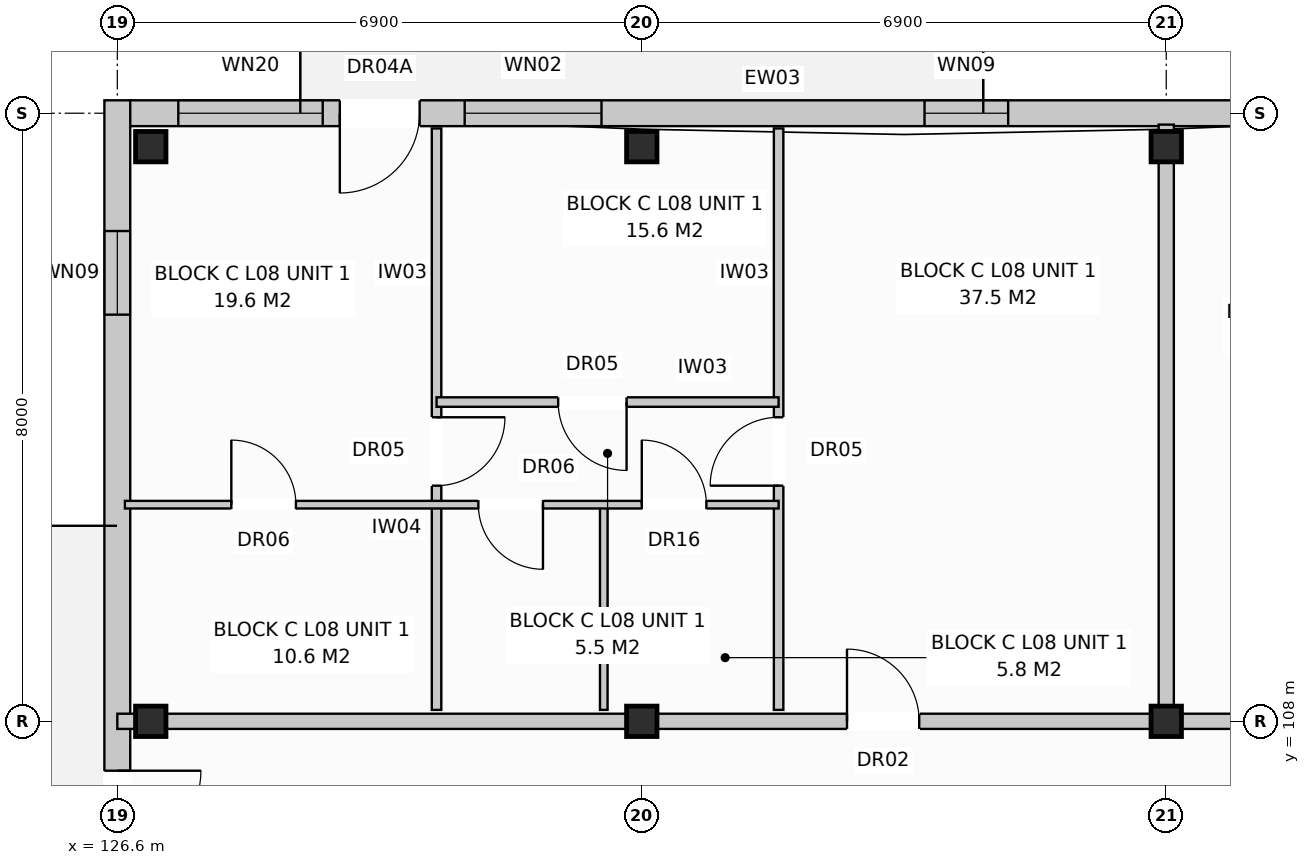
"""IFC4 building model, lengths in metres.
Left out: names, types, materials, properties, quantities, classifications, styles, units other than length and angle.
Written with IfcOpenShell. Run it as: python <this file> out.ifc"""

import sys

from ifc_helpers import new_model, si_unit, direction, frame, frame_2d, origin, origin_with_axes, origin_2d, place, context, subcontext, project, spatial, rectangle, extrude, element, fill, save


model = new_model("IFC4")
c1 = context("Model", 3, precision=1e-05, world=origin(), true_north=direction((0.0, 1.0)))
c2 = subcontext(c1, "Body", "Model", "MODEL_VIEW")
j1 = project(units=[si_unit("LENGTHUNIT", "METRE"), si_unit("PLANEANGLEUNIT", "RADIAN")], contexts=[c1])
p1 = place(None, origin())
s1 = spatial("IfcSite", under=j1, at=p1, CompositionType="ELEMENT")
p2 = place(p1, origin())
s2 = spatial("IfcBuilding", under=s1, at=p2, CompositionType="ELEMENT")
p3 = place(p2, frame((0.0, 0.0, 27.2)))
s3 = spatial("IfcBuildingStorey", under=s2, at=p3, CompositionType="ELEMENT", Elevation=27.2)
for number, where, z_axis, x_axis in (
    (1, (127.04, 108.0, 0.0), (0.0, 0.0, 1.0), (1.0, 0.0, 0.0)),
    (2, (127.04, 115.56, 0.0), (0.0, 0.0, 1.0), (1.0, 0.0, 0.0)),
    (3, (133.5, 108.0, 0.0), (0.0, 0.0, 1.0), (1.0, 0.0, 0.0)),
    (4, (133.5, 115.56, 0.0), (0.0, 0.0, 1.0), (1.0, 0.0, 0.0)),
    (5, (140.4, 108.0, 0.0), (0.0, 0.0, 1.0), (1.0, 0.0, 0.0)),
    (6, (140.4, 115.56, 0.0), (0.0, 0.0, 1.0), (1.0, 0.0, 0.0)),
):
    element("IfcColumn", number, at=place(p3, frame(where, z_axis=z_axis, x_axis=x_axis)), inside=s3, PredefinedType="COLUMN", context=c2, shape_type="SweptSolid", body=[
        extrude(rectangle(XDim=0.4, YDim=0.4, at=origin_2d()), origin(), (0.0, 0.0, 1.0), 3.2),
    ])
p4 = place(p3, frame((126.76, 116.0, 0.0), z_axis=(0.0, 0.0, 1.0), x_axis=(1.0, 0.0, 0.0)))
e7 = element("IfcWall", 7, at=p4, inside=s3, PredefinedType="STANDARD", context=c2, shape_type="SweptSolid", body=[
    extrude(rectangle(XDim=41.08, YDim=0.34, at=frame_2d((20.54, 0.0))), origin(), (0.0, 0.0, 1.0), 2.96),
])
p5 = place(p4, frame((2.767, 0.0, 0.0)))
e8 = element("IfcOpeningElement", 8, at=p5, cuts=e7, PredefinedType="OPENING", context=c2, shape_type="SweptSolid", body=[
    extrude(rectangle(XDim=1.05, YDim=2.12, at=frame_2d((0.525, 1.06))), frame((0.0, 0.182, 0.0), z_axis=(0.0, -1.0, 0.0), x_axis=(1.0, 0.0, 0.0)), (0.0, 0.0, 1.0), 0.364),
])
p6 = place(p4, frame((17.567, 0.0, 0.0)))
e9 = element("IfcOpeningElement", 9, at=p6, cuts=e7, PredefinedType="OPENING", context=c2, shape_type="SweptSolid", body=[
    extrude(rectangle(XDim=1.05, YDim=2.12, at=frame_2d((0.525, 1.06))), frame((0.0, 0.182, 0.0), z_axis=(0.0, -1.0, 0.0), x_axis=(1.0, 0.0, 0.0)), (0.0, 0.0, 1.0), 0.364),
])
p7 = place(p4, frame((30.067, 0.0, 0.0)))
e10 = element("IfcOpeningElement", 10, at=p7, cuts=e7, PredefinedType="OPENING", context=c2, shape_type="SweptSolid", body=[
    extrude(rectangle(XDim=1.05, YDim=2.12, at=frame_2d((0.525, 1.06))), frame((0.0, 0.182, 0.0), z_axis=(0.0, -1.0, 0.0), x_axis=(1.0, 0.0, 0.0)), (0.0, 0.0, 1.0), 0.364),
])
p8 = place(p4, frame((0.642, 0.0, 0.8)))
e11 = element("IfcOpeningElement", 11, at=p8, cuts=e7, PredefinedType="OPENING", context=c2, shape_type="SweptSolid", body=[
    extrude(rectangle(XDim=1.9, YDim=1.85, at=frame_2d((0.95, 0.925))), frame((0.0, 0.182, 0.0), z_axis=(0.0, -1.0, 0.0), x_axis=(1.0, 0.0, 0.0)), (0.0, 0.0, 1.0), 0.364),
])
p9 = place(p4, frame((4.41, 0.0, 0.8)))
e12 = element("IfcOpeningElement", 12, at=p9, cuts=e7, PredefinedType="OPENING", context=c2, shape_type="SweptSolid", body=[
    extrude(rectangle(XDim=1.8, YDim=1.7, at=frame_2d((0.9, 0.85))), frame((0.0, 0.182, 0.0), z_axis=(0.0, -1.0, 0.0), x_axis=(1.0, 0.0, 0.0)), (0.0, 0.0, 1.0), 0.364),
])
p10 = place(p4, frame((10.46, 0.0, 0.72)))
e13 = element("IfcOpeningElement", 13, at=p10, cuts=e7, PredefinedType="OPENING", context=c2, shape_type="SweptSolid", body=[
    extrude(rectangle(XDim=1.1, YDim=1.5, at=frame_2d((0.55, 0.75))), frame((0.0, 0.182, 0.0), z_axis=(0.0, -1.0, 0.0), x_axis=(1.0, 0.0, 0.0)), (0.0, 0.0, 1.0), 0.364),
])
p11 = place(p4, frame((15.76, 0.0, 0.72)))
e14 = element("IfcOpeningElement", 14, at=p11, cuts=e7, PredefinedType="OPENING", context=c2, shape_type="SweptSolid", body=[
    extrude(rectangle(XDim=1.1, YDim=1.5, at=frame_2d((0.55, 0.75))), frame((0.0, 0.182, 0.0), z_axis=(0.0, -1.0, 0.0), x_axis=(1.0, 0.0, 0.0)), (0.0, 0.0, 1.0), 0.364),
])
p12 = place(p4, frame((21.11, 0.0, 0.8)))
e15 = element("IfcOpeningElement", 15, at=p12, cuts=e7, PredefinedType="OPENING", context=c2, shape_type="SweptSolid", body=[
    extrude(rectangle(XDim=1.8, YDim=1.7, at=frame_2d((0.9, 0.85))), frame((0.0, 0.182, 0.0), z_axis=(0.0, -1.0, 0.0), x_axis=(1.0, 0.0, 0.0)), (0.0, 0.0, 1.0), 0.364),
])
p13 = place(p4, frame((24.66, 0.0, 0.72)))
e16 = element("IfcOpeningElement", 16, at=p13, cuts=e7, PredefinedType="OPENING", context=c2, shape_type="SweptSolid", body=[
    extrude(rectangle(XDim=1.1, YDim=1.5, at=frame_2d((0.55, 0.75))), frame((0.0, 0.182, 0.0), z_axis=(0.0, -1.0, 0.0), x_axis=(1.0, 0.0, 0.0)), (0.0, 0.0, 1.0), 0.364),
])
p14 = place(p4, frame((27.892, 0.0, 0.8)))
e17 = element("IfcOpeningElement", 17, at=p14, cuts=e7, PredefinedType="OPENING", context=c2, shape_type="SweptSolid", body=[
    extrude(rectangle(XDim=1.95, YDim=1.65, at=frame_2d((0.975, 0.825))), frame((0.0, 0.182, 0.0), z_axis=(0.0, -1.0, 0.0), x_axis=(1.0, 0.0, 0.0)), (0.0, 0.0, 1.0), 0.364),
])
p15 = place(p4, frame((31.91, 0.0, 0.8)))
e18 = element("IfcOpeningElement", 18, at=p15, cuts=e7, PredefinedType="OPENING", context=c2, shape_type="SweptSolid", body=[
    extrude(rectangle(XDim=1.8, YDim=1.7, at=frame_2d((0.9, 0.85))), frame((0.0, 0.182, 0.0), z_axis=(0.0, -1.0, 0.0), x_axis=(1.0, 0.0, 0.0)), (0.0, 0.0, 1.0), 0.364),
])
p16 = place(p4, frame((35.36, 0.0, 0.72)))
e19 = element("IfcOpeningElement", 19, at=p16, cuts=e7, PredefinedType="OPENING", context=c2, shape_type="SweptSolid", body=[
    extrude(rectangle(XDim=1.9, YDim=1.85, at=frame_2d((0.95, 0.925))), frame((0.0, 0.182, 0.0), z_axis=(0.0, -1.0, 0.0), x_axis=(1.0, 0.0, 0.0)), (0.0, 0.0, 1.0), 0.364),
])
p17 = place(p4, frame((38.525, 0.0, 0.8)))
e20 = element("IfcOpeningElement", 20, at=p17, cuts=e7, PredefinedType="OPENING", context=c2, shape_type="SweptSolid", body=[
    extrude(rectangle(XDim=1.95, YDim=1.65, at=frame_2d((0.975, 0.825))), frame((0.0, 0.182, 0.0), z_axis=(0.0, -1.0, 0.0), x_axis=(1.0, 0.0, 0.0)), (0.0, 0.0, 1.0), 0.364),
])
p18 = place(p3, frame((126.6, 97.43, 0.0), z_axis=(0.0, 0.0, 1.0), x_axis=(0.0, 1.0, 0.0)))
e21 = element("IfcWall", 21, at=p18, inside=s3, PredefinedType="STANDARD", context=c2, shape_type="SweptSolid", body=[
    extrude(rectangle(XDim=18.74, YDim=0.34, at=frame_2d((9.37, 0.0))), origin(), (0.0, 0.0, 1.0), 2.96),
])
p19 = place(p18, frame((8.82, 0.0, 0.0)))
e22 = element("IfcOpeningElement", 22, at=p19, cuts=e21, PredefinedType="OPENING", context=c2, shape_type="SweptSolid", body=[
    extrude(rectangle(XDim=1.1, YDim=2.1, at=frame_2d((0.55, 1.05))), frame((0.0, 0.182, 0.0), z_axis=(0.0, -1.0, 0.0), x_axis=(1.0, 0.0, 0.0)), (0.0, 0.0, 1.0), 0.364),
])
p20 = place(p18, frame((15.92, 0.0, 0.72)))
e23 = element("IfcOpeningElement", 23, at=p20, cuts=e21, PredefinedType="OPENING", context=c2, shape_type="SweptSolid", body=[
    extrude(rectangle(XDim=1.1, YDim=1.5, at=frame_2d((0.55, 0.75))), frame((0.0, 0.182, 0.0), z_axis=(0.0, -1.0, 0.0), x_axis=(1.0, 0.0, 0.0)), (0.0, 0.0, 1.0), 0.364),
])
p21 = place(p3, frame((140.4, 108.15, 0.0), z_axis=(0.0, 0.0, 1.0), x_axis=(0.0, 1.0, 0.0)))
e24 = element("IfcWall", 24, at=p21, inside=s3, PredefinedType="PARTITIONING", context=c2, shape_type="SweptSolid", body=[
    extrude(rectangle(XDim=7.7, YDim=0.2, at=frame_2d((3.85, 0.0))), origin(), (0.0, 0.0, 1.0), 2.96),
])
p22 = place(p3, frame((126.6, 108.0, 0.0), z_axis=(0.0, 0.0, 1.0), x_axis=(1.0, 0.0, 0.0)))
e25 = element("IfcWall", 25, at=p22, inside=s3, PredefinedType="PARTITIONING", context=c2, shape_type="SweptSolid", body=[
    extrude(rectangle(XDim=13.8, YDim=0.2, at=frame_2d((6.9, 0.0))), origin(), (0.0, 0.0, 1.0), 2.4),
])
p23 = place(p22, frame((9.6, 0.0, 0.0)))
e26 = element("IfcOpeningElement", 26, at=p23, cuts=e25, PredefinedType="OPENING", context=c2, shape_type="SweptSolid", body=[
    extrude(rectangle(XDim=0.95, YDim=2.15, at=frame_2d((0.475, 1.075))), frame((0.0, 0.112, 0.0), z_axis=(0.0, -1.0, 0.0), x_axis=(1.0, 0.0, 0.0)), (0.0, 0.0, 1.0), 0.224),
])
p24 = place(p3, frame((135.3, 108.15, 0.0), z_axis=(0.0, 0.0, 1.0), x_axis=(0.0, 1.0, 0.0)))
e27 = element("IfcWall", 27, at=p24, inside=s3, PredefinedType="PARTITIONING", context=c2, shape_type="SweptSolid", body=[
    extrude(rectangle(XDim=7.65, YDim=0.125, at=frame_2d((3.825, 0.0))), origin(), (0.0, 0.0, 1.0), 2.96),
])
p25 = place(p24, frame((2.95, 0.0, 0.0)))
e28 = element("IfcOpeningElement", 28, at=p25, cuts=e27, PredefinedType="OPENING", context=c2, shape_type="SweptSolid", body=[
    extrude(rectangle(XDim=0.9, YDim=2.1, at=frame_2d((0.45, 1.05))), frame((0.0, 0.074, 0.0), z_axis=(0.0, -1.0, 0.0), x_axis=(1.0, 0.0, 0.0)), (0.0, 0.0, 1.0), 0.149),
])
p26 = place(p3, frame((130.8, 108.15, 0.0), z_axis=(0.0, 0.0, 1.0), x_axis=(0.0, 1.0, 0.0)))
e29 = element("IfcWall", 29, at=p26, inside=s3, PredefinedType="PARTITIONING", context=c2, shape_type="SweptSolid", body=[
    extrude(rectangle(XDim=7.65, YDim=0.125, at=frame_2d((3.825, 0.0))), origin(), (0.0, 0.0, 1.0), 2.96),
])
p27 = place(p26, frame((2.95, 0.0, 0.0)))
e30 = element("IfcOpeningElement", 30, at=p27, cuts=e29, PredefinedType="OPENING", context=c2, shape_type="SweptSolid", body=[
    extrude(rectangle(XDim=0.9, YDim=2.1, at=frame_2d((0.45, 1.05))), frame((0.0, 0.074, 0.0), z_axis=(0.0, -1.0, 0.0), x_axis=(1.0, 0.0, 0.0)), (0.0, 0.0, 1.0), 0.149),
])
p28 = place(p3, frame((133.0, 108.15, 0.0), z_axis=(0.0, 0.0, 1.0), x_axis=(0.0, 1.0, 0.0)))
e31 = element("IfcWall", 31, at=p28, inside=s3, PredefinedType="PARTITIONING", context=c2, shape_type="SweptSolid", body=[
    extrude(rectangle(XDim=2.7, YDim=0.1, at=frame_2d((1.35, 0.0))), origin(), (0.0, 0.0, 1.0), 2.96),
])
p29 = place(p3, frame((126.7, 110.85, 0.0), z_axis=(0.0, 0.0, 1.0), x_axis=(1.0, 0.0, 0.0)))
e32 = element("IfcWall", 32, at=p29, inside=s3, PredefinedType="PARTITIONING", context=c2, shape_type="SweptSolid", body=[
    extrude(rectangle(XDim=8.6, YDim=0.1, at=frame_2d((4.3, 0.0))), origin(), (0.0, 0.0, 1.0), 2.96),
])
p30 = place(p29, frame((1.4, 0.0, 0.0)))
e33 = element("IfcOpeningElement", 33, at=p30, cuts=e32, PredefinedType="OPENING", context=c2, shape_type="SweptSolid", body=[
    extrude(rectangle(XDim=0.85, YDim=2.05, at=frame_2d((0.425, 1.025))), frame((0.0, 0.062, 0.0), z_axis=(0.0, -1.0, 0.0), x_axis=(1.0, 0.0, 0.0)), (0.0, 0.0, 1.0), 0.124),
])
p31 = place(p29, frame((4.65, 0.0, 0.0)))
e34 = element("IfcOpeningElement", 34, at=p31, cuts=e32, PredefinedType="OPENING", context=c2, shape_type="SweptSolid", body=[
    extrude(rectangle(XDim=0.85, YDim=2.05, at=frame_2d((0.425, 1.025))), frame((0.0, 0.062, 0.0), z_axis=(0.0, -1.0, 0.0), x_axis=(1.0, 0.0, 0.0)), (0.0, 0.0, 1.0), 0.124),
])
p32 = place(p29, frame((6.8, 0.0, 0.0)))
e35 = element("IfcOpeningElement", 35, at=p32, cuts=e32, PredefinedType="OPENING", context=c2, shape_type="SweptSolid", body=[
    extrude(rectangle(XDim=0.85, YDim=2.1, at=frame_2d((0.425, 1.05))), frame((0.0, 0.062, 0.0), z_axis=(0.0, -1.0, 0.0), x_axis=(1.0, 0.0, 0.0)), (0.0, 0.0, 1.0), 0.124),
])
p33 = place(p3, frame((130.8, 112.2, 0.0), z_axis=(0.0, 0.0, 1.0), x_axis=(1.0, 0.0, 0.0)))
e36 = element("IfcWall", 36, at=p33, inside=s3, PredefinedType="PARTITIONING", context=c2, shape_type="SweptSolid", body=[
    extrude(rectangle(XDim=4.5, YDim=0.125, at=frame_2d((2.25, 0.0))), origin(), (0.0, 0.0, 1.0), 2.96),
])
p34 = place(p33, frame((1.6, 0.0, 0.0)))
e37 = element("IfcOpeningElement", 37, at=p34, cuts=e36, PredefinedType="OPENING", context=c2, shape_type="SweptSolid", body=[
    extrude(rectangle(XDim=0.9, YDim=2.1, at=frame_2d((0.45, 1.05))), frame((0.0, 0.074, 0.0), z_axis=(0.0, -1.0, 0.0), x_axis=(1.0, 0.0, 0.0)), (0.0, 0.0, 1.0), 0.149),
])
p35 = place(p3, frame((140.4, 108.0, 0.0), z_axis=(0.0, 0.0, 1.0), x_axis=(1.0, 0.0, 0.0)))
e38 = element("IfcWall", 38, at=p35, inside=s3, PredefinedType="PARTITIONING", context=c2, shape_type="SweptSolid", body=[
    extrude(rectangle(XDim=13.8, YDim=0.2, at=frame_2d((6.9, 0.0))), origin(), (0.0, 0.0, 1.0), 2.4),
])
p36 = place(p35, frame((2.4, 0.0, 0.0)))
e39 = element("IfcOpeningElement", 39, at=p36, cuts=e38, PredefinedType="OPENING", context=c2, shape_type="SweptSolid", body=[
    extrude(rectangle(XDim=0.95, YDim=2.15, at=frame_2d((0.475, 1.075))), frame((0.0, 0.112, 0.0), z_axis=(0.0, -1.0, 0.0), x_axis=(1.0, 0.0, 0.0)), (0.0, 0.0, 1.0), 0.224),
])
p37 = place(p5, frame((1.05, 0.0, 0.0), z_axis=(0.0, 0.0, 1.0), x_axis=(-1.0, 0.0, 0.0)))
e40 = element("IfcDoor", 40, at=p37, inside=s3, OperationType="SINGLE_SWING_LEFT", PredefinedType="DOOR", context=c2, shape_type="SweptSolid", body=[
    extrude(rectangle(XDim=1.05, YDim=2.12, at=frame_2d((0.525, 1.06))), frame((0.0, 0.025, 0.0), z_axis=(0.0, -1.0, 0.0), x_axis=(1.0, 0.0, 0.0)), (0.0, 0.0, 1.0), 0.05),
])
fill(e8, e40)
p38 = place(p8, origin_with_axes())
e41 = element("IfcWindow", 41, at=p38, inside=s3, PartitioningType="SINGLE_PANEL", PredefinedType="WINDOW", context=c2, shape_type="SweptSolid", body=[
    extrude(rectangle(XDim=1.9, YDim=1.85, at=frame_2d((0.95, 0.925))), frame((0.0, 0.03, 0.0), z_axis=(0.0, -1.0, 0.0), x_axis=(1.0, 0.0, 0.0)), (0.0, 0.0, 1.0), 0.06),
])
fill(e11, e41)
p39 = place(p9, origin_with_axes())
e42 = element("IfcWindow", 42, at=p39, inside=s3, PartitioningType="SINGLE_PANEL", PredefinedType="WINDOW", context=c2, shape_type="SweptSolid", body=[
    extrude(rectangle(XDim=1.8, YDim=1.7, at=frame_2d((0.9, 0.85))), frame((0.0, 0.03, 0.0), z_axis=(0.0, -1.0, 0.0), x_axis=(1.0, 0.0, 0.0)), (0.0, 0.0, 1.0), 0.06),
])
fill(e12, e42)
p40 = place(p10, origin_with_axes())
e43 = element("IfcWindow", 43, at=p40, inside=s3, PartitioningType="SINGLE_PANEL", PredefinedType="WINDOW", context=c2, shape_type="SweptSolid", body=[
    extrude(rectangle(XDim=1.1, YDim=1.5, at=frame_2d((0.55, 0.75))), frame((0.0, 0.03, 0.0), z_axis=(0.0, -1.0, 0.0), x_axis=(1.0, 0.0, 0.0)), (0.0, 0.0, 1.0), 0.06),
])
fill(e13, e43)
p41 = place(p19, frame((1.1, 0.0, 0.0), z_axis=(0.0, 0.0, 1.0), x_axis=(-1.0, 0.0, 0.0)))
e44 = element("IfcDoor", 44, at=p41, inside=s3, OperationType="SINGLE_SWING_RIGHT", PredefinedType="DOOR", context=c2, shape_type="SweptSolid", body=[
    extrude(rectangle(XDim=1.1, YDim=2.1, at=frame_2d((0.55, 1.05))), frame((0.0, 0.025, 0.0), z_axis=(0.0, -1.0, 0.0), x_axis=(1.0, 0.0, 0.0)), (0.0, 0.0, 1.0), 0.05),
])
fill(e22, e44)
p42 = place(p20, origin_with_axes())
e45 = element("IfcWindow", 45, at=p42, inside=s3, PartitioningType="SINGLE_PANEL", PredefinedType="WINDOW", context=c2, shape_type="SweptSolid", body=[
    extrude(rectangle(XDim=1.1, YDim=1.5, at=frame_2d((0.55, 0.75))), frame((0.0, 0.03, 0.0), z_axis=(0.0, -1.0, 0.0), x_axis=(1.0, 0.0, 0.0)), (0.0, 0.0, 1.0), 0.06),
])
fill(e23, e45)
p43 = place(p23, origin_with_axes())
e46 = element("IfcDoor", 46, at=p43, inside=s3, OperationType="SINGLE_SWING_LEFT", PredefinedType="DOOR", context=c2, shape_type="SweptSolid", body=[
    extrude(rectangle(XDim=0.95, YDim=2.15, at=frame_2d((0.475, 1.075))), frame((0.0, 0.025, 0.0), z_axis=(0.0, -1.0, 0.0), x_axis=(1.0, 0.0, 0.0)), (0.0, 0.0, 1.0), 0.05),
])
fill(e26, e46)
p44 = place(p25, origin_with_axes())
e47 = element("IfcDoor", 47, at=p44, inside=s3, OperationType="SINGLE_SWING_LEFT", PredefinedType="DOOR", context=c2, shape_type="SweptSolid", body=[
    extrude(rectangle(XDim=0.9, YDim=2.1, at=frame_2d((0.45, 1.05))), frame((0.0, 0.025, 0.0), z_axis=(0.0, -1.0, 0.0), x_axis=(1.0, 0.0, 0.0)), (0.0, 0.0, 1.0), 0.05),
])
fill(e28, e47)
p45 = place(p27, frame((0.9, 0.0, 0.0), z_axis=(0.0, 0.0, 1.0), x_axis=(-1.0, 0.0, 0.0)))
e48 = element("IfcDoor", 48, at=p45, inside=s3, OperationType="SINGLE_SWING_RIGHT", PredefinedType="DOOR", context=c2, shape_type="SweptSolid", body=[
    extrude(rectangle(XDim=0.9, YDim=2.1, at=frame_2d((0.45, 1.05))), frame((0.0, 0.025, 0.0), z_axis=(0.0, -1.0, 0.0), x_axis=(1.0, 0.0, 0.0)), (0.0, 0.0, 1.0), 0.05),
])
fill(e30, e48)
p46 = place(p30, origin_with_axes())
e49 = element("IfcDoor", 49, at=p46, inside=s3, OperationType="SINGLE_SWING_LEFT", PredefinedType="DOOR", context=c2, shape_type="SweptSolid", body=[
    extrude(rectangle(XDim=0.85, YDim=2.05, at=frame_2d((0.425, 1.025))), frame((0.0, 0.025, 0.0), z_axis=(0.0, -1.0, 0.0), x_axis=(1.0, 0.0, 0.0)), (0.0, 0.0, 1.0), 0.05),
])
fill(e33, e49)
p47 = place(p31, frame((0.85, 0.0, 0.0), z_axis=(0.0, 0.0, 1.0), x_axis=(-1.0, 0.0, 0.0)))
e50 = element("IfcDoor", 50, at=p47, inside=s3, OperationType="SINGLE_SWING_RIGHT", PredefinedType="DOOR", context=c2, shape_type="SweptSolid", body=[
    extrude(rectangle(XDim=0.85, YDim=2.05, at=frame_2d((0.425, 1.025))), frame((0.0, 0.025, 0.0), z_axis=(0.0, -1.0, 0.0), x_axis=(1.0, 0.0, 0.0)), (0.0, 0.0, 1.0), 0.05),
])
fill(e34, e50)
p48 = place(p32, origin_with_axes())
e51 = element("IfcDoor", 51, at=p48, inside=s3, OperationType="SINGLE_SWING_LEFT", PredefinedType="DOOR", context=c2, shape_type="SweptSolid", body=[
    extrude(rectangle(XDim=0.85, YDim=2.1, at=frame_2d((0.425, 1.05))), frame((0.0, 0.025, 0.0), z_axis=(0.0, -1.0, 0.0), x_axis=(1.0, 0.0, 0.0)), (0.0, 0.0, 1.0), 0.05),
])
fill(e35, e51)
p49 = place(p34, frame((0.9, 0.0, 0.0), z_axis=(0.0, 0.0, 1.0), x_axis=(-1.0, 0.0, 0.0)))
e52 = element("IfcDoor", 52, at=p49, inside=s3, OperationType="SINGLE_SWING_RIGHT", PredefinedType="DOOR", context=c2, shape_type="SweptSolid", body=[
    extrude(rectangle(XDim=0.9, YDim=2.1, at=frame_2d((0.45, 1.05))), frame((0.0, 0.025, 0.0), z_axis=(0.0, -1.0, 0.0), x_axis=(1.0, 0.0, 0.0)), (0.0, 0.0, 1.0), 0.05),
])
fill(e37, e52)
save(model, sys.argv[1])
